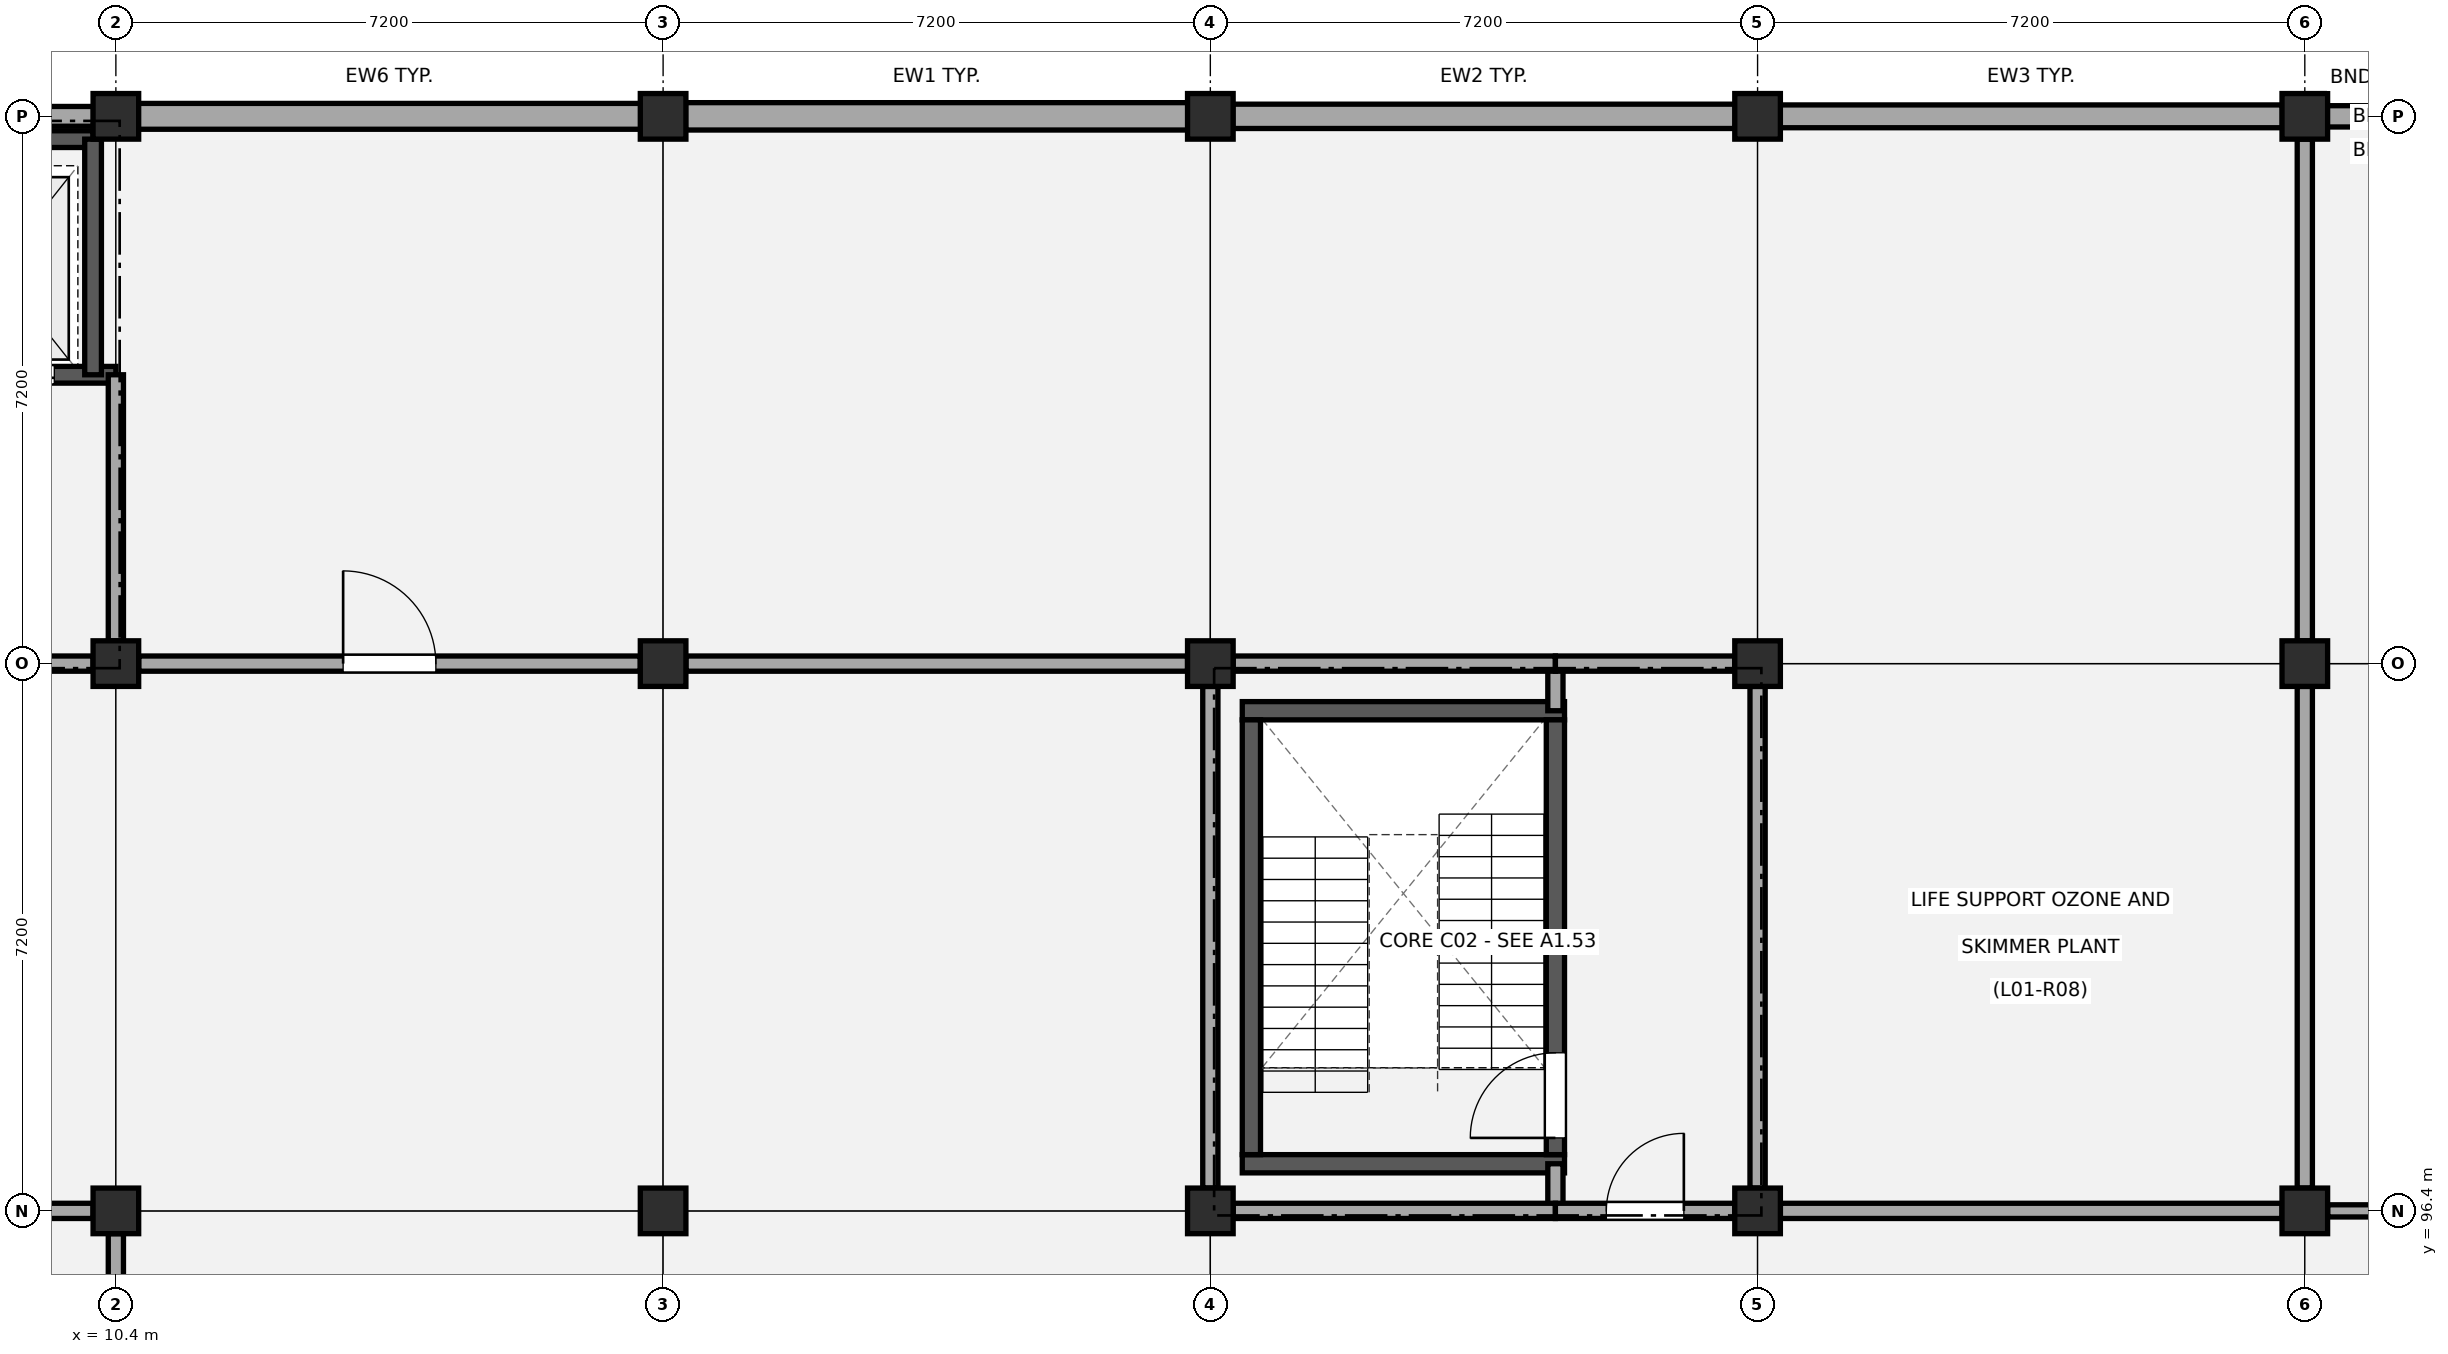
"""IFC4 building model, lengths in metres.
Left out: names, types, materials, properties, quantities, classifications, styles, units other than length and angle.
Written with IfcOpenShell. Run it as: python <this file> out.ifc"""

import sys

from ifc_helpers import new_model, si_unit, direction, frame, frame_2d, origin, origin_2d, place, context, subcontext, project, spatial, rectangle, extrude, element, fill, save


model = new_model("IFC4")
c1 = context("Model", 3, precision=1e-05, world=origin(), true_north=direction((0.0, 1.0)))
c2 = subcontext(c1, "Body", "Model", "MODEL_VIEW")
j1 = project(units=[si_unit("LENGTHUNIT", "METRE"), si_unit("PLANEANGLEUNIT", "RADIAN")], contexts=[c1])
p1 = place(None, origin())
s1 = spatial("IfcSite", under=j1, at=p1, CompositionType="ELEMENT")
p2 = place(p1, origin())
s2 = spatial("IfcBuilding", under=s1, at=p2, CompositionType="ELEMENT")
p3 = place(p2, frame((0.0, 0.0, 4.68)))
s3 = spatial("IfcBuildingStorey", under=s2, at=p3, CompositionType="ELEMENT", Elevation=4.68)
for number, where, z_axis, x_axis in (
    (1, (10.4, 96.4, 0.0), (0.0, 0.0, 1.0), (1.0, 0.0, 0.0)),
    (2, (10.4, 103.6, 0.0), (0.0, 0.0, 1.0), (1.0, 0.0, 0.0)),
    (3, (10.4, 110.8, 0.0), (0.0, 0.0, 1.0), (1.0, 0.0, 0.0)),
    (4, (17.6, 96.4, 0.0), (0.0, 0.0, 1.0), (1.0, 0.0, 0.0)),
    (5, (17.6, 103.6, 0.0), (0.0, 0.0, 1.0), (1.0, 0.0, 0.0)),
    (6, (17.6, 110.8, 0.0), (0.0, 0.0, 1.0), (1.0, 0.0, 0.0)),
    (7, (24.8, 96.4, 0.0), (0.0, 0.0, 1.0), (1.0, 0.0, 0.0)),
    (8, (24.8, 103.6, 0.0), (0.0, 0.0, 1.0), (1.0, 0.0, 0.0)),
    (9, (24.8, 110.8, 0.0), (0.0, 0.0, 1.0), (1.0, 0.0, 0.0)),
    (10, (32.0, 96.4, 0.0), (0.0, 0.0, 1.0), (1.0, 0.0, 0.0)),
    (11, (32.0, 103.6, 0.0), (0.0, 0.0, 1.0), (1.0, 0.0, 0.0)),
    (12, (32.0, 110.8, 0.0), (0.0, 0.0, 1.0), (1.0, 0.0, 0.0)),
    (13, (39.2, 96.4, 0.0), (0.0, 0.0, 1.0), (1.0, 0.0, 0.0)),
    (14, (39.2, 103.6, 0.0), (0.0, 0.0, 1.0), (1.0, 0.0, 0.0)),
    (15, (39.2, 110.8, 0.0), (0.0, 0.0, 1.0), (1.0, 0.0, 0.0)),
):
    element("IfcColumn", number, at=place(p3, frame(where, z_axis=z_axis, x_axis=x_axis)), inside=s3, PredefinedType="COLUMN", context=c2, shape_type="SweptSolid", body=[
        extrude(rectangle(XDim=0.6, YDim=0.6, at=origin_2d()), origin(), (0.0, 0.0, 1.0), 4.5),
    ])
p4 = place(p3, frame((3.495, 110.8, 0.0), z_axis=(0.0, 0.0, 1.0), x_axis=(1.0, 0.0, 0.0)))
e16 = element("IfcWall", 16, at=p4, inside=s3, PredefinedType="STANDARD", context=c2, shape_type="SweptSolid", body=[
    extrude(rectangle(XDim=6.61, YDim=0.26, at=frame_2d((3.305, 0.0))), origin(), (0.0, 0.0, 1.0), 3.49),
])
p5 = place(p3, frame((10.695, 110.8, 0.0), z_axis=(0.0, 0.0, 1.0), x_axis=(1.0, 0.0, 0.0)))
e17 = element("IfcWall", 17, at=p5, inside=s3, PredefinedType="STANDARD", context=c2, shape_type="SweptSolid", body=[
    extrude(rectangle(XDim=6.61, YDim=0.34, at=frame_2d((3.305, 0.0))), origin(), (0.0, 0.0, 1.0), 3.51),
])
p6 = place(p3, frame((17.895, 110.8, 0.0), z_axis=(0.0, 0.0, 1.0), x_axis=(1.0, 0.0, 0.0)))
e18 = element("IfcWall", 18, at=p6, inside=s3, PredefinedType="STANDARD", context=c2, shape_type="SweptSolid", body=[
    extrude(rectangle(XDim=6.61, YDim=0.36, at=frame_2d((3.305, 0.0))), origin(), (0.0, 0.0, 1.0), 3.49),
])
p7 = place(p3, frame((25.095, 110.8, 0.0), z_axis=(0.0, 0.0, 1.0), x_axis=(1.0, 0.0, 0.0)))
e19 = element("IfcWall", 19, at=p7, inside=s3, PredefinedType="STANDARD", context=c2, shape_type="SweptSolid", body=[
    extrude(rectangle(XDim=6.61, YDim=0.32, at=frame_2d((3.305, 0.0))), origin(), (0.0, 0.0, 1.0), 3.51),
])
p8 = place(p3, frame((32.295, 110.8, 0.0), z_axis=(0.0, 0.0, 1.0), x_axis=(1.0, 0.0, 0.0)))
e20 = element("IfcWall", 20, at=p8, inside=s3, PredefinedType="STANDARD", context=c2, shape_type="SweptSolid", body=[
    extrude(rectangle(XDim=6.61, YDim=0.3, at=frame_2d((3.305, 0.0))), origin(), (0.0, 0.0, 1.0), 3.49),
])
p9 = place(p3, frame((39.495, 110.8, 0.0), z_axis=(0.0, 0.0, 1.0), x_axis=(1.0, 0.0, 0.0)))
e21 = element("IfcWall", 21, at=p9, inside=s3, PredefinedType="STANDARD", context=c2, shape_type="SweptSolid", body=[
    extrude(rectangle(XDim=6.61, YDim=0.28, at=frame_2d((3.305, 0.0))), origin(), (0.0, 0.0, 1.0), 3.51),
])
p10 = place(p3, frame((7.74, 107.4, 0.0), z_axis=(0.0, 0.0, 1.0), x_axis=(1.0, 0.0, 0.0)))
e22 = element("IfcWall", 22, at=p10, inside=s3, PredefinedType="SHEAR", context=c2, shape_type="SweptSolid", body=[
    extrude(rectangle(XDim=2.66, YDim=0.22, at=frame_2d((1.33, 0.0))), origin(), (0.0, 0.0, 1.0), 4.2),
])
p11 = place(p10, frame((0.51, 0.0, 0.0)))
e23 = element("IfcOpeningElement", 23, at=p11, cuts=e22, PredefinedType="OPENING", context=c2, shape_type="SweptSolid", body=[
    extrude(rectangle(XDim=1.34, YDim=2.15, at=frame_2d((0.67, 1.075))), frame((0.0, 0.12, 0.0), z_axis=(0.0, -1.0, 0.0), x_axis=(1.0, 0.0, 0.0)), (0.0, 0.0, 1.0), 0.24),
])
p12 = place(p3, frame((7.74, 110.5, 0.0), z_axis=(0.0, 0.0, 1.0), x_axis=(1.0, 0.0, 0.0)))
e24 = element("IfcWall", 24, at=p12, inside=s3, PredefinedType="SHEAR", context=c2, shape_type="SweptSolid", body=[
    extrude(rectangle(XDim=2.36, YDim=0.22, at=frame_2d((1.18, 0.0))), origin(), (0.0, 0.0, 1.0), 4.2),
])
p13 = place(p3, frame((10.1, 107.4, 0.0), z_axis=(0.0, 0.0, 1.0), x_axis=(0.0, 1.0, 0.0)))
e25 = element("IfcWall", 25, at=p13, inside=s3, PredefinedType="SHEAR", context=c2, shape_type="SweptSolid", body=[
    extrude(rectangle(XDim=3.1, YDim=0.22, at=frame_2d((1.55, 0.0))), origin(), (0.0, 0.0, 1.0), 4.2),
])
p14 = place(p3, frame((10.4, 103.9, 0.0), z_axis=(0.0, 0.0, 1.0), x_axis=(0.0, 1.0, 0.0)))
e26 = element("IfcWall", 26, at=p14, inside=s3, PredefinedType="PARTITIONING", context=c2, shape_type="SweptSolid", body=[
    extrude(rectangle(XDim=3.5, YDim=0.2, at=frame_2d((1.75, 0.0))), origin(), (0.0, 0.0, 1.0), 3.54),
])
p15 = place(p3, frame((7.74, 103.6, 0.0), z_axis=(0.0, 0.0, 1.0), x_axis=(1.0, 0.0, 0.0)))
e27 = element("IfcWall", 27, at=p15, inside=s3, PredefinedType="PARTITIONING", context=c2, shape_type="SweptSolid", body=[
    extrude(rectangle(XDim=2.36, YDim=0.2, at=frame_2d((1.18, 0.0))), origin(), (0.0, 0.0, 1.0), 3.54),
])
p16 = place(p15, frame((0.67, 0.0, 0.0)))
e28 = element("IfcOpeningElement", 28, at=p16, cuts=e27, PredefinedType="OPENING", context=c2, shape_type="SweptSolid", body=[
    extrude(rectangle(XDim=1.02, YDim=2.15, at=frame_2d((0.51, 1.075))), frame((0.0, 0.11, 0.0), z_axis=(0.0, -1.0, 0.0), x_axis=(1.0, 0.0, 0.0)), (0.0, 0.0, 1.0), 0.22),
])
for number, where, z_axis, x_axis in (
    (29, (25.22, 97.02, 0.0), (0.0, 0.0, 1.0), (1.0, 0.0, 0.0)),
    (30, (25.22, 102.98, 0.0), (0.0, 0.0, 1.0), (1.0, 0.0, 0.0)),
):
    element("IfcWall", number, at=place(p3, frame(where, z_axis=z_axis, x_axis=x_axis)), inside=s3, PredefinedType="SHEAR", context=c2, shape_type="SweptSolid", body=[
        extrude(rectangle(XDim=4.24, YDim=0.24, at=frame_2d((2.12, 0.0))), origin(), (0.0, 0.0, 1.0), 4.2),
    ])
p17 = place(p3, frame((25.34, 97.14, 0.0), z_axis=(0.0, 0.0, 1.0), x_axis=(0.0, 1.0, 0.0)))
e31 = element("IfcWall", 31, at=p17, inside=s3, PredefinedType="SHEAR", context=c2, shape_type="SweptSolid", body=[
    extrude(rectangle(XDim=5.72, YDim=0.24, at=frame_2d((2.86, 0.0))), origin(), (0.0, 0.0, 1.0), 4.2),
])
p18 = place(p3, frame((29.34, 97.14, 0.0), z_axis=(0.0, 0.0, 1.0), x_axis=(0.0, 1.0, 0.0)))
e32 = element("IfcWall", 32, at=p18, inside=s3, PredefinedType="SHEAR", context=c2, shape_type="SweptSolid", body=[
    extrude(rectangle(XDim=5.72, YDim=0.24, at=frame_2d((2.86, 0.0))), origin(), (0.0, 0.0, 1.0), 4.2),
])
p19 = place(p18, frame((0.22, 0.0, 0.0)))
e33 = element("IfcOpeningElement", 33, at=p19, cuts=e32, PredefinedType="OPENING", context=c2, shape_type="SweptSolid", body=[
    extrude(rectangle(XDim=1.12, YDim=2.15, at=frame_2d((0.56, 1.075))), frame((0.0, 0.13, 0.0), z_axis=(0.0, -1.0, 0.0), x_axis=(1.0, 0.0, 0.0)), (0.0, 0.0, 1.0), 0.26),
])
p20 = place(p3, frame((29.34, 96.4, 0.0), z_axis=(0.0, 0.0, 1.0), x_axis=(0.0, 1.0, 0.0)))
e34 = element("IfcWall", 34, at=p20, inside=s3, PredefinedType="PARTITIONING", context=c2, shape_type="SweptSolid", body=[
    extrude(rectangle(XDim=0.62, YDim=0.2, at=frame_2d((0.31, 0.0))), origin(), (0.0, 0.0, 1.0), 3.54),
])
p21 = place(p3, frame((29.34, 102.98, 0.0), z_axis=(0.0, 0.0, 1.0), x_axis=(0.0, 1.0, 0.0)))
e35 = element("IfcWall", 35, at=p21, inside=s3, PredefinedType="PARTITIONING", context=c2, shape_type="SweptSolid", body=[
    extrude(rectangle(XDim=0.62, YDim=0.2, at=frame_2d((0.31, 0.0))), origin(), (0.0, 0.0, 1.0), 3.59),
])
for number, where, z_axis, x_axis in (
    (36, (24.8, 96.7, 0.0), (0.0, 0.0, 1.0), (0.0, 1.0, 0.0)),
    (37, (32.0, 96.7, 0.0), (0.0, 0.0, 1.0), (0.0, 1.0, 0.0)),
):
    element("IfcWall", number, at=place(p3, frame(where, z_axis=z_axis, x_axis=x_axis)), inside=s3, PredefinedType="PARTITIONING", context=c2, shape_type="SweptSolid", body=[
        extrude(rectangle(XDim=6.6, YDim=0.2, at=frame_2d((3.3, 0.0))), origin(), (0.0, 0.0, 1.0), 3.59),
    ])
p22 = place(p3, frame((25.1, 96.4, 0.0), z_axis=(0.0, 0.0, 1.0), x_axis=(1.0, 0.0, 0.0)))
e38 = element("IfcWall", 38, at=p22, inside=s3, PredefinedType="PARTITIONING", context=c2, shape_type="SweptSolid", body=[
    extrude(rectangle(XDim=4.24, YDim=0.2, at=frame_2d((2.12, 0.0))), origin(), (0.0, 0.0, 1.0), 3.54),
])
p23 = place(p3, frame((29.34, 96.4, 0.0), z_axis=(0.0, 0.0, 1.0), x_axis=(1.0, 0.0, 0.0)))
e39 = element("IfcWall", 39, at=p23, inside=s3, PredefinedType="PARTITIONING", context=c2, shape_type="SweptSolid", body=[
    extrude(rectangle(XDim=2.36, YDim=0.2, at=frame_2d((1.18, 0.0))), origin(), (0.0, 0.0, 1.0), 3.54),
])
p24 = place(p23, frame((0.67, 0.0, 0.0)))
e40 = element("IfcOpeningElement", 40, at=p24, cuts=e39, PredefinedType="OPENING", context=c2, shape_type="SweptSolid", body=[
    extrude(rectangle(XDim=1.02, YDim=2.15, at=frame_2d((0.51, 1.075))), frame((0.0, 0.11, 0.0), z_axis=(0.0, -1.0, 0.0), x_axis=(1.0, 0.0, 0.0)), (0.0, 0.0, 1.0), 0.22),
])
p25 = place(p3, frame((25.1, 103.6, 0.0), z_axis=(0.0, 0.0, 1.0), x_axis=(1.0, 0.0, 0.0)))
e41 = element("IfcWall", 41, at=p25, inside=s3, PredefinedType="PARTITIONING", context=c2, shape_type="SweptSolid", body=[
    extrude(rectangle(XDim=4.24, YDim=0.2, at=frame_2d((2.12, 0.0))), origin(), (0.0, 0.0, 1.0), 3.59),
])
p26 = place(p3, frame((29.34, 103.6, 0.0), z_axis=(0.0, 0.0, 1.0), x_axis=(1.0, 0.0, 0.0)))
e42 = element("IfcWall", 42, at=p26, inside=s3, PredefinedType="PARTITIONING", context=c2, shape_type="SweptSolid", body=[
    extrude(rectangle(XDim=2.36, YDim=0.2, at=frame_2d((1.18, 0.0))), origin(), (0.0, 0.0, 1.0), 3.59),
])
p27 = place(p3, frame((10.4, 89.5, 0.0), z_axis=(0.0, 0.0, 1.0), x_axis=(0.0, 1.0, 0.0)))
e43 = element("IfcWall", 43, at=p27, inside=s3, PredefinedType="PARTITIONING", context=c2, shape_type="SweptSolid", body=[
    extrude(rectangle(XDim=6.6, YDim=0.2, at=frame_2d((3.3, 0.0))), origin(), (0.0, 0.0, 1.0), 3.54),
])
p28 = place(p27, frame((2.69, 0.0, 0.0)))
e44 = element("IfcOpeningElement", 44, at=p28, cuts=e43, PredefinedType="OPENING", context=c2, shape_type="SweptSolid", body=[
    extrude(rectangle(XDim=1.22, YDim=2.16, at=frame_2d((0.61, 1.08))), frame((0.0, 0.11, 0.0), z_axis=(0.0, -1.0, 0.0), x_axis=(1.0, 0.0, 0.0)), (0.0, 0.0, 1.0), 0.22),
])
p29 = place(p3, frame((3.5, 96.4, 0.0), z_axis=(0.0, 0.0, 1.0), x_axis=(1.0, 0.0, 0.0)))
e45 = element("IfcWall", 45, at=p29, inside=s3, PredefinedType="PARTITIONING", context=c2, shape_type="SweptSolid", body=[
    extrude(rectangle(XDim=6.6, YDim=0.2, at=frame_2d((3.3, 0.0))), origin(), (0.0, 0.0, 1.0), 3.59),
])
p30 = place(p3, frame((10.7, 103.6, 0.0), z_axis=(0.0, 0.0, 1.0), x_axis=(1.0, 0.0, 0.0)))
e46 = element("IfcWall", 46, at=p30, inside=s3, PredefinedType="PARTITIONING", context=c2, shape_type="SweptSolid", body=[
    extrude(rectangle(XDim=6.6, YDim=0.2, at=frame_2d((3.3, 0.0))), origin(), (0.0, 0.0, 1.0), 3.59),
])
p31 = place(p30, frame((2.69, 0.0, 0.0)))
e47 = element("IfcOpeningElement", 47, at=p31, cuts=e46, PredefinedType="OPENING", context=c2, shape_type="SweptSolid", body=[
    extrude(rectangle(XDim=1.22, YDim=2.16, at=frame_2d((0.61, 1.08))), frame((0.0, 0.11, 0.0), z_axis=(0.0, -1.0, 0.0), x_axis=(1.0, 0.0, 0.0)), (0.0, 0.0, 1.0), 0.22),
])
p32 = place(p3, frame((17.9, 103.6, 0.0), z_axis=(0.0, 0.0, 1.0), x_axis=(1.0, 0.0, 0.0)))
e48 = element("IfcWall", 48, at=p32, inside=s3, PredefinedType="PARTITIONING", context=c2, shape_type="SweptSolid", body=[
    extrude(rectangle(XDim=6.6, YDim=0.2, at=frame_2d((3.3, 0.0))), origin(), (0.0, 0.0, 1.0), 3.54),
])
p33 = place(p3, frame((32.3, 96.4, 0.0), z_axis=(0.0, 0.0, 1.0), x_axis=(1.0, 0.0, 0.0)))
e49 = element("IfcWall", 49, at=p33, inside=s3, PredefinedType="PARTITIONING", context=c2, shape_type="SweptSolid", body=[
    extrude(rectangle(XDim=6.6, YDim=0.2, at=frame_2d((3.3, 0.0))), origin(), (0.0, 0.0, 1.0), 3.59),
])
p34 = place(p3, frame((39.2, 96.7, 0.0), z_axis=(0.0, 0.0, 1.0), x_axis=(0.0, 1.0, 0.0)))
e50 = element("IfcWall", 50, at=p34, inside=s3, PredefinedType="PARTITIONING", context=c2, shape_type="SweptSolid", body=[
    extrude(rectangle(XDim=6.6, YDim=0.2, at=frame_2d((3.3, 0.0))), origin(), (0.0, 0.0, 1.0), 3.59),
])
p35 = place(p3, frame((39.2, 103.9, 0.0), z_axis=(0.0, 0.0, 1.0), x_axis=(0.0, 1.0, 0.0)))
e51 = element("IfcWall", 51, at=p35, inside=s3, PredefinedType="PARTITIONING", context=c2, shape_type="SweptSolid", body=[
    extrude(rectangle(XDim=6.6, YDim=0.2, at=frame_2d((3.3, 0.0))), origin(), (0.0, 0.0, 1.0), 3.54),
])
p36 = place(p3, frame((39.5, 96.4, 0.0), z_axis=(0.0, 0.0, 1.0), x_axis=(1.0, 0.0, 0.0)))
e52 = element("IfcWall", 52, at=p36, inside=s3, PredefinedType="PARTITIONING", context=c2, shape_type="SweptSolid", body=[
    extrude(rectangle(XDim=6.6, YDim=0.16, at=frame_2d((3.3, 0.0))), origin(), (0.0, 0.0, 1.0), 3.54),
])
p37 = place(p36, frame((2.47, 0.0, 0.0)))
e53 = element("IfcOpeningElement", 53, at=p37, cuts=e52, PredefinedType="OPENING", context=c2, shape_type="SweptSolid", body=[
    extrude(rectangle(XDim=1.66, YDim=2.22, at=frame_2d((0.83, 1.11))), frame((0.0, 0.09, 0.0), z_axis=(0.0, -1.0, 0.0), x_axis=(1.0, 0.0, 0.0)), (0.0, 0.0, 1.0), 0.18),
])
p38 = place(p11, origin())
e54 = element("IfcDoor", 54, at=p38, inside=s3, OperationType="DOUBLE_DOOR_SLIDING", PredefinedType="DOOR", context=c2, shape_type="SweptSolid", body=[
    extrude(rectangle(XDim=1.34, YDim=2.15, at=frame_2d((0.67, 1.075))), frame((0.0, 0.025, 0.0), z_axis=(0.0, -1.0, 0.0), x_axis=(1.0, 0.0, 0.0)), (0.0, 0.0, 1.0), 0.05),
])
fill(e23, e54)
p39 = place(p19, origin())
e55 = element("IfcDoor", 55, at=p39, inside=s3, OperationType="SINGLE_SWING_LEFT", PredefinedType="DOOR", context=c2, shape_type="SweptSolid", body=[
    extrude(rectangle(XDim=1.12, YDim=2.15, at=frame_2d((0.56, 1.075))), frame((0.0, 0.025, 0.0), z_axis=(0.0, -1.0, 0.0), x_axis=(1.0, 0.0, 0.0)), (0.0, 0.0, 1.0), 0.05),
])
fill(e33, e55)
p40 = place(p24, origin())
e56 = element("IfcDoor", 56, at=p40, inside=s3, OperationType="SINGLE_SWING_RIGHT", PredefinedType="DOOR", context=c2, shape_type="SweptSolid", body=[
    extrude(rectangle(XDim=1.02, YDim=2.15, at=frame_2d((0.51, 1.075))), frame((0.0, 0.025, 0.0), z_axis=(0.0, -1.0, 0.0), x_axis=(1.0, 0.0, 0.0)), (0.0, 0.0, 1.0), 0.05),
])
fill(e40, e56)
p41 = place(p31, origin())
e57 = element("IfcDoor", 57, at=p41, inside=s3, OperationType="SINGLE_SWING_LEFT", PredefinedType="DOOR", context=c2, shape_type="SweptSolid", body=[
    extrude(rectangle(XDim=1.22, YDim=2.16, at=frame_2d((0.61, 1.08))), frame((0.0, 0.025, 0.0), z_axis=(0.0, -1.0, 0.0), x_axis=(1.0, 0.0, 0.0)), (0.0, 0.0, 1.0), 0.05),
])
fill(e47, e57)
save(model, sys.argv[1])
